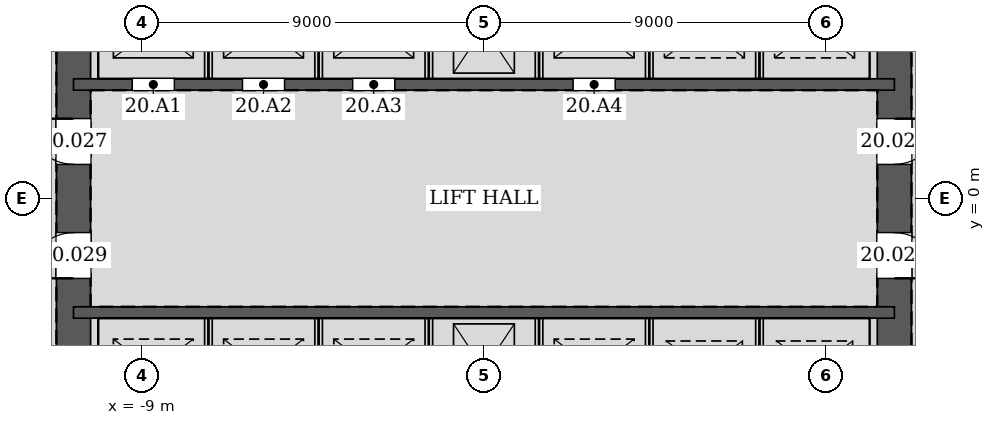
"""IFC4 building model, lengths in metres.
Left out: names, types, materials, properties, quantities, classifications, styles, units other than length and angle.
Written with IfcOpenShell. Run it as: python <this file> out.ifc"""

import sys

from ifc_helpers import new_model, si_unit, direction, frame, frame_2d, origin, place, context, subcontext, project, spatial, rectangle, extrude, element, fill, save


model = new_model("IFC4")
c1 = context("Model", 3, precision=1e-05, world=origin(), true_north=direction((0.0, 1.0)))
c2 = subcontext(c1, "Body", "Model", "MODEL_VIEW")
j1 = project(units=[si_unit("LENGTHUNIT", "METRE"), si_unit("PLANEANGLEUNIT", "RADIAN")], contexts=[c1])
p1 = place(None, origin())
s1 = spatial("IfcSite", under=j1, at=p1, CompositionType="ELEMENT")
p2 = place(p1, origin())
s2 = spatial("IfcBuilding", under=s1, at=p2, CompositionType="ELEMENT")
p3 = place(p2, frame((0.0, 0.0, 91.8)))
s3 = spatial("IfcBuildingStorey", under=s2, at=p3, CompositionType="ELEMENT", Elevation=91.8)
p4 = place(p3, frame((10.8, -10.8, 0.0), z_axis=(0.0, 0.0, 1.0), x_axis=(0.0, 1.0, 0.0)))
e1 = element("IfcWall", 1, at=p4, inside=s3, PredefinedType="SOLIDWALL", context=c2, shape_type="SweptSolid", body=[
    extrude(rectangle(XDim=21.6, YDim=0.9, at=frame_2d((10.8, 0.0))), origin(), (0.0, 0.0, 1.0), 4.2),
])
p5 = place(p4, frame((11.7, 0.0, 0.0)))
e2 = element("IfcOpeningElement", 2, at=p5, cuts=e1, PredefinedType="OPENING", context=c2, shape_type="SweptSolid", body=[
    extrude(rectangle(XDim=1.2, YDim=2.1, at=frame_2d((0.6, 1.05))), frame((0.0, 0.46, 0.0), z_axis=(0.0, -1.0, 0.0), x_axis=(1.0, 0.0, 0.0)), (0.0, 0.0, 1.0), 0.92),
])
p6 = place(p4, frame((8.7, 0.0, 0.0)))
e3 = element("IfcOpeningElement", 3, at=p6, cuts=e1, PredefinedType="OPENING", context=c2, shape_type="SweptSolid", body=[
    extrude(rectangle(XDim=1.2, YDim=2.1, at=frame_2d((0.6, 1.05))), frame((0.0, 0.46, 0.0), z_axis=(0.0, -1.0, 0.0), x_axis=(1.0, 0.0, 0.0)), (0.0, 0.0, 1.0), 0.92),
])
p7 = place(p3, frame((-10.8, 10.8, 0.0), z_axis=(0.0, 0.0, 1.0), x_axis=(0.0, -1.0, 0.0)))
e4 = element("IfcWall", 4, at=p7, inside=s3, PredefinedType="SOLIDWALL", context=c2, shape_type="SweptSolid", body=[
    extrude(rectangle(XDim=21.6, YDim=0.9, at=frame_2d((10.8, 0.0))), origin(), (0.0, 0.0, 1.0), 4.2),
])
p8 = place(p7, frame((8.7, 0.0, 0.0)))
e5 = element("IfcOpeningElement", 5, at=p8, cuts=e4, PredefinedType="OPENING", context=c2, shape_type="SweptSolid", body=[
    extrude(rectangle(XDim=1.2, YDim=2.1, at=frame_2d((0.6, 1.05))), frame((0.0, 0.46, 0.0), z_axis=(0.0, -1.0, 0.0), x_axis=(1.0, 0.0, 0.0)), (0.0, 0.0, 1.0), 0.92),
])
p9 = place(p7, frame((11.7, 0.0, 0.0)))
e6 = element("IfcOpeningElement", 6, at=p9, cuts=e4, PredefinedType="OPENING", context=c2, shape_type="SweptSolid", body=[
    extrude(rectangle(XDim=1.2, YDim=2.1, at=frame_2d((0.6, 1.05))), frame((0.0, 0.46, 0.0), z_axis=(0.0, -1.0, 0.0), x_axis=(1.0, 0.0, 0.0)), (0.0, 0.0, 1.0), 0.92),
])
p10 = place(p3, frame((-10.8, 3.0, 0.0), z_axis=(0.0, 0.0, 1.0), x_axis=(1.0, 0.0, 0.0)))
e7 = element("IfcWall", 7, at=p10, inside=s3, PredefinedType="SOLIDWALL", context=c2, shape_type="SweptSolid", body=[
    extrude(rectangle(XDim=21.6, YDim=0.3, at=frame_2d((10.8, 0.0))), origin(), (0.0, 0.0, 1.0), 4.2),
])
p11 = place(p10, frame((1.55, 0.0, 0.0)))
e8 = element("IfcOpeningElement", 8, at=p11, cuts=e7, PredefinedType="OPENING", context=c2, shape_type="SweptSolid", body=[
    extrude(rectangle(XDim=1.1, YDim=2.1, at=frame_2d((0.55, 1.05))), frame((0.0, 0.16, 0.0), z_axis=(0.0, -1.0, 0.0), x_axis=(1.0, 0.0, 0.0)), (0.0, 0.0, 1.0), 0.32),
])
p12 = place(p10, frame((4.45, 0.0, 0.0)))
e9 = element("IfcOpeningElement", 9, at=p12, cuts=e7, PredefinedType="OPENING", context=c2, shape_type="SweptSolid", body=[
    extrude(rectangle(XDim=1.1, YDim=2.1, at=frame_2d((0.55, 1.05))), frame((0.0, 0.16, 0.0), z_axis=(0.0, -1.0, 0.0), x_axis=(1.0, 0.0, 0.0)), (0.0, 0.0, 1.0), 0.32),
])
p13 = place(p10, frame((7.35, 0.0, 0.0)))
e10 = element("IfcOpeningElement", 10, at=p13, cuts=e7, PredefinedType="OPENING", context=c2, shape_type="SweptSolid", body=[
    extrude(rectangle(XDim=1.1, YDim=2.1, at=frame_2d((0.55, 1.05))), frame((0.0, 0.16, 0.0), z_axis=(0.0, -1.0, 0.0), x_axis=(1.0, 0.0, 0.0)), (0.0, 0.0, 1.0), 0.32),
])
p14 = place(p10, frame((13.15, 0.0, 0.0)))
e11 = element("IfcOpeningElement", 11, at=p14, cuts=e7, PredefinedType="OPENING", context=c2, shape_type="SweptSolid", body=[
    extrude(rectangle(XDim=1.1, YDim=2.1, at=frame_2d((0.55, 1.05))), frame((0.0, 0.16, 0.0), z_axis=(0.0, -1.0, 0.0), x_axis=(1.0, 0.0, 0.0)), (0.0, 0.0, 1.0), 0.32),
])
p15 = place(p3, frame((-10.8, -3.0, 0.0), z_axis=(0.0, 0.0, 1.0), x_axis=(1.0, 0.0, 0.0)))
e12 = element("IfcWall", 12, at=p15, inside=s3, PredefinedType="SOLIDWALL", context=c2, shape_type="SweptSolid", body=[
    extrude(rectangle(XDim=21.6, YDim=0.3, at=frame_2d((10.8, 0.0))), origin(), (0.0, 0.0, 1.0), 4.2),
])
for number, where, z_axis, x_axis in (
    (13, (-7.25, 3.15, 0.0), (0.0, 0.0, 1.0), (0.0, 1.0, 0.0)),
    (14, (-4.35, 3.15, 0.0), (0.0, 0.0, 1.0), (0.0, 1.0, 0.0)),
    (15, (-1.45, 3.15, 0.0), (0.0, 0.0, 1.0), (0.0, 1.0, 0.0)),
    (16, (1.45, 3.15, 0.0), (0.0, 0.0, 1.0), (0.0, 1.0, 0.0)),
    (17, (4.35, 3.15, 0.0), (0.0, 0.0, 1.0), (0.0, 1.0, 0.0)),
    (18, (7.25, 3.15, 0.0), (0.0, 0.0, 1.0), (0.0, 1.0, 0.0)),
    (19, (-7.25, -5.85, 0.0), (0.0, 0.0, 1.0), (0.0, 1.0, 0.0)),
    (20, (-4.35, -5.85, 0.0), (0.0, 0.0, 1.0), (0.0, 1.0, 0.0)),
    (21, (-1.45, -5.85, 0.0), (0.0, 0.0, 1.0), (0.0, 1.0, 0.0)),
    (22, (1.45, -5.85, 0.0), (0.0, 0.0, 1.0), (0.0, 1.0, 0.0)),
    (23, (4.35, -5.85, 0.0), (0.0, 0.0, 1.0), (0.0, 1.0, 0.0)),
    (24, (7.25, -5.85, 0.0), (0.0, 0.0, 1.0), (0.0, 1.0, 0.0)),
):
    element("IfcWall", number, at=place(p3, frame(where, z_axis=z_axis, x_axis=x_axis)), inside=s3, PredefinedType="PARTITIONING", context=c2, shape_type="SweptSolid", body=[
        extrude(rectangle(XDim=2.7, YDim=0.2, at=frame_2d((1.35, 0.0))), origin(), (0.0, 0.0, 1.0), 4.2),
    ])
p16 = place(p5, frame((1.2, 0.0, 0.0), z_axis=(0.0, 0.0, 1.0), x_axis=(-1.0, 0.0, 0.0)))
e25 = element("IfcDoor", 25, at=p16, inside=s3, OperationType="SINGLE_SWING_LEFT", PredefinedType="DOOR", context=c2, shape_type="SweptSolid", body=[
    extrude(rectangle(XDim=1.2, YDim=2.1, at=frame_2d((0.6, 1.05))), frame((0.0, 0.025, 0.0), z_axis=(0.0, -1.0, 0.0), x_axis=(1.0, 0.0, 0.0)), (0.0, 0.0, 1.0), 0.05),
])
fill(e2, e25)
p17 = place(p8, frame((1.2, 0.0, 0.0), z_axis=(0.0, 0.0, 1.0), x_axis=(-1.0, 0.0, 0.0)))
e26 = element("IfcDoor", 26, at=p17, inside=s3, OperationType="SINGLE_SWING_RIGHT", PredefinedType="DOOR", context=c2, shape_type="SweptSolid", body=[
    extrude(rectangle(XDim=1.2, YDim=2.1, at=frame_2d((0.6, 1.05))), frame((0.0, 0.025, 0.0), z_axis=(0.0, -1.0, 0.0), x_axis=(1.0, 0.0, 0.0)), (0.0, 0.0, 1.0), 0.05),
])
fill(e5, e26)
p18 = place(p6, frame((1.2, 0.0, 0.0), z_axis=(0.0, 0.0, 1.0), x_axis=(-1.0, 0.0, 0.0)))
e27 = element("IfcDoor", 27, at=p18, inside=s3, OperationType="SINGLE_SWING_RIGHT", PredefinedType="DOOR", context=c2, shape_type="SweptSolid", body=[
    extrude(rectangle(XDim=1.2, YDim=2.1, at=frame_2d((0.6, 1.05))), frame((0.0, 0.025, 0.0), z_axis=(0.0, -1.0, 0.0), x_axis=(1.0, 0.0, 0.0)), (0.0, 0.0, 1.0), 0.05),
])
fill(e3, e27)
p19 = place(p9, frame((1.2, 0.0, 0.0), z_axis=(0.0, 0.0, 1.0), x_axis=(-1.0, 0.0, 0.0)))
e28 = element("IfcDoor", 28, at=p19, inside=s3, OperationType="SINGLE_SWING_LEFT", PredefinedType="DOOR", context=c2, shape_type="SweptSolid", body=[
    extrude(rectangle(XDim=1.2, YDim=2.1, at=frame_2d((0.6, 1.05))), frame((0.0, 0.025, 0.0), z_axis=(0.0, -1.0, 0.0), x_axis=(1.0, 0.0, 0.0)), (0.0, 0.0, 1.0), 0.05),
])
fill(e6, e28)
p20 = place(p11, origin())
e29 = element("IfcDoor", 29, at=p20, inside=s3, OperationType="DOUBLE_DOOR_SLIDING", PredefinedType="DOOR", context=c2, shape_type="SweptSolid", body=[
    extrude(rectangle(XDim=1.1, YDim=2.1, at=frame_2d((0.55, 1.05))), frame((0.0, 0.025, 0.0), z_axis=(0.0, -1.0, 0.0), x_axis=(1.0, 0.0, 0.0)), (0.0, 0.0, 1.0), 0.05),
])
fill(e8, e29)
p21 = place(p12, origin())
e30 = element("IfcDoor", 30, at=p21, inside=s3, OperationType="DOUBLE_DOOR_SLIDING", PredefinedType="DOOR", context=c2, shape_type="SweptSolid", body=[
    extrude(rectangle(XDim=1.1, YDim=2.1, at=frame_2d((0.55, 1.05))), frame((0.0, 0.025, 0.0), z_axis=(0.0, -1.0, 0.0), x_axis=(1.0, 0.0, 0.0)), (0.0, 0.0, 1.0), 0.05),
])
fill(e9, e30)
p22 = place(p13, origin())
e31 = element("IfcDoor", 31, at=p22, inside=s3, OperationType="DOUBLE_DOOR_SLIDING", PredefinedType="DOOR", context=c2, shape_type="SweptSolid", body=[
    extrude(rectangle(XDim=1.1, YDim=2.1, at=frame_2d((0.55, 1.05))), frame((0.0, 0.025, 0.0), z_axis=(0.0, -1.0, 0.0), x_axis=(1.0, 0.0, 0.0)), (0.0, 0.0, 1.0), 0.05),
])
fill(e10, e31)
p23 = place(p14, origin())
e32 = element("IfcDoor", 32, at=p23, inside=s3, OperationType="DOUBLE_DOOR_SLIDING", PredefinedType="DOOR", context=c2, shape_type="SweptSolid", body=[
    extrude(rectangle(XDim=1.1, YDim=2.1, at=frame_2d((0.55, 1.05))), frame((0.0, 0.025, 0.0), z_axis=(0.0, -1.0, 0.0), x_axis=(1.0, 0.0, 0.0)), (0.0, 0.0, 1.0), 0.05),
])
fill(e11, e32)
save(model, sys.argv[1])
